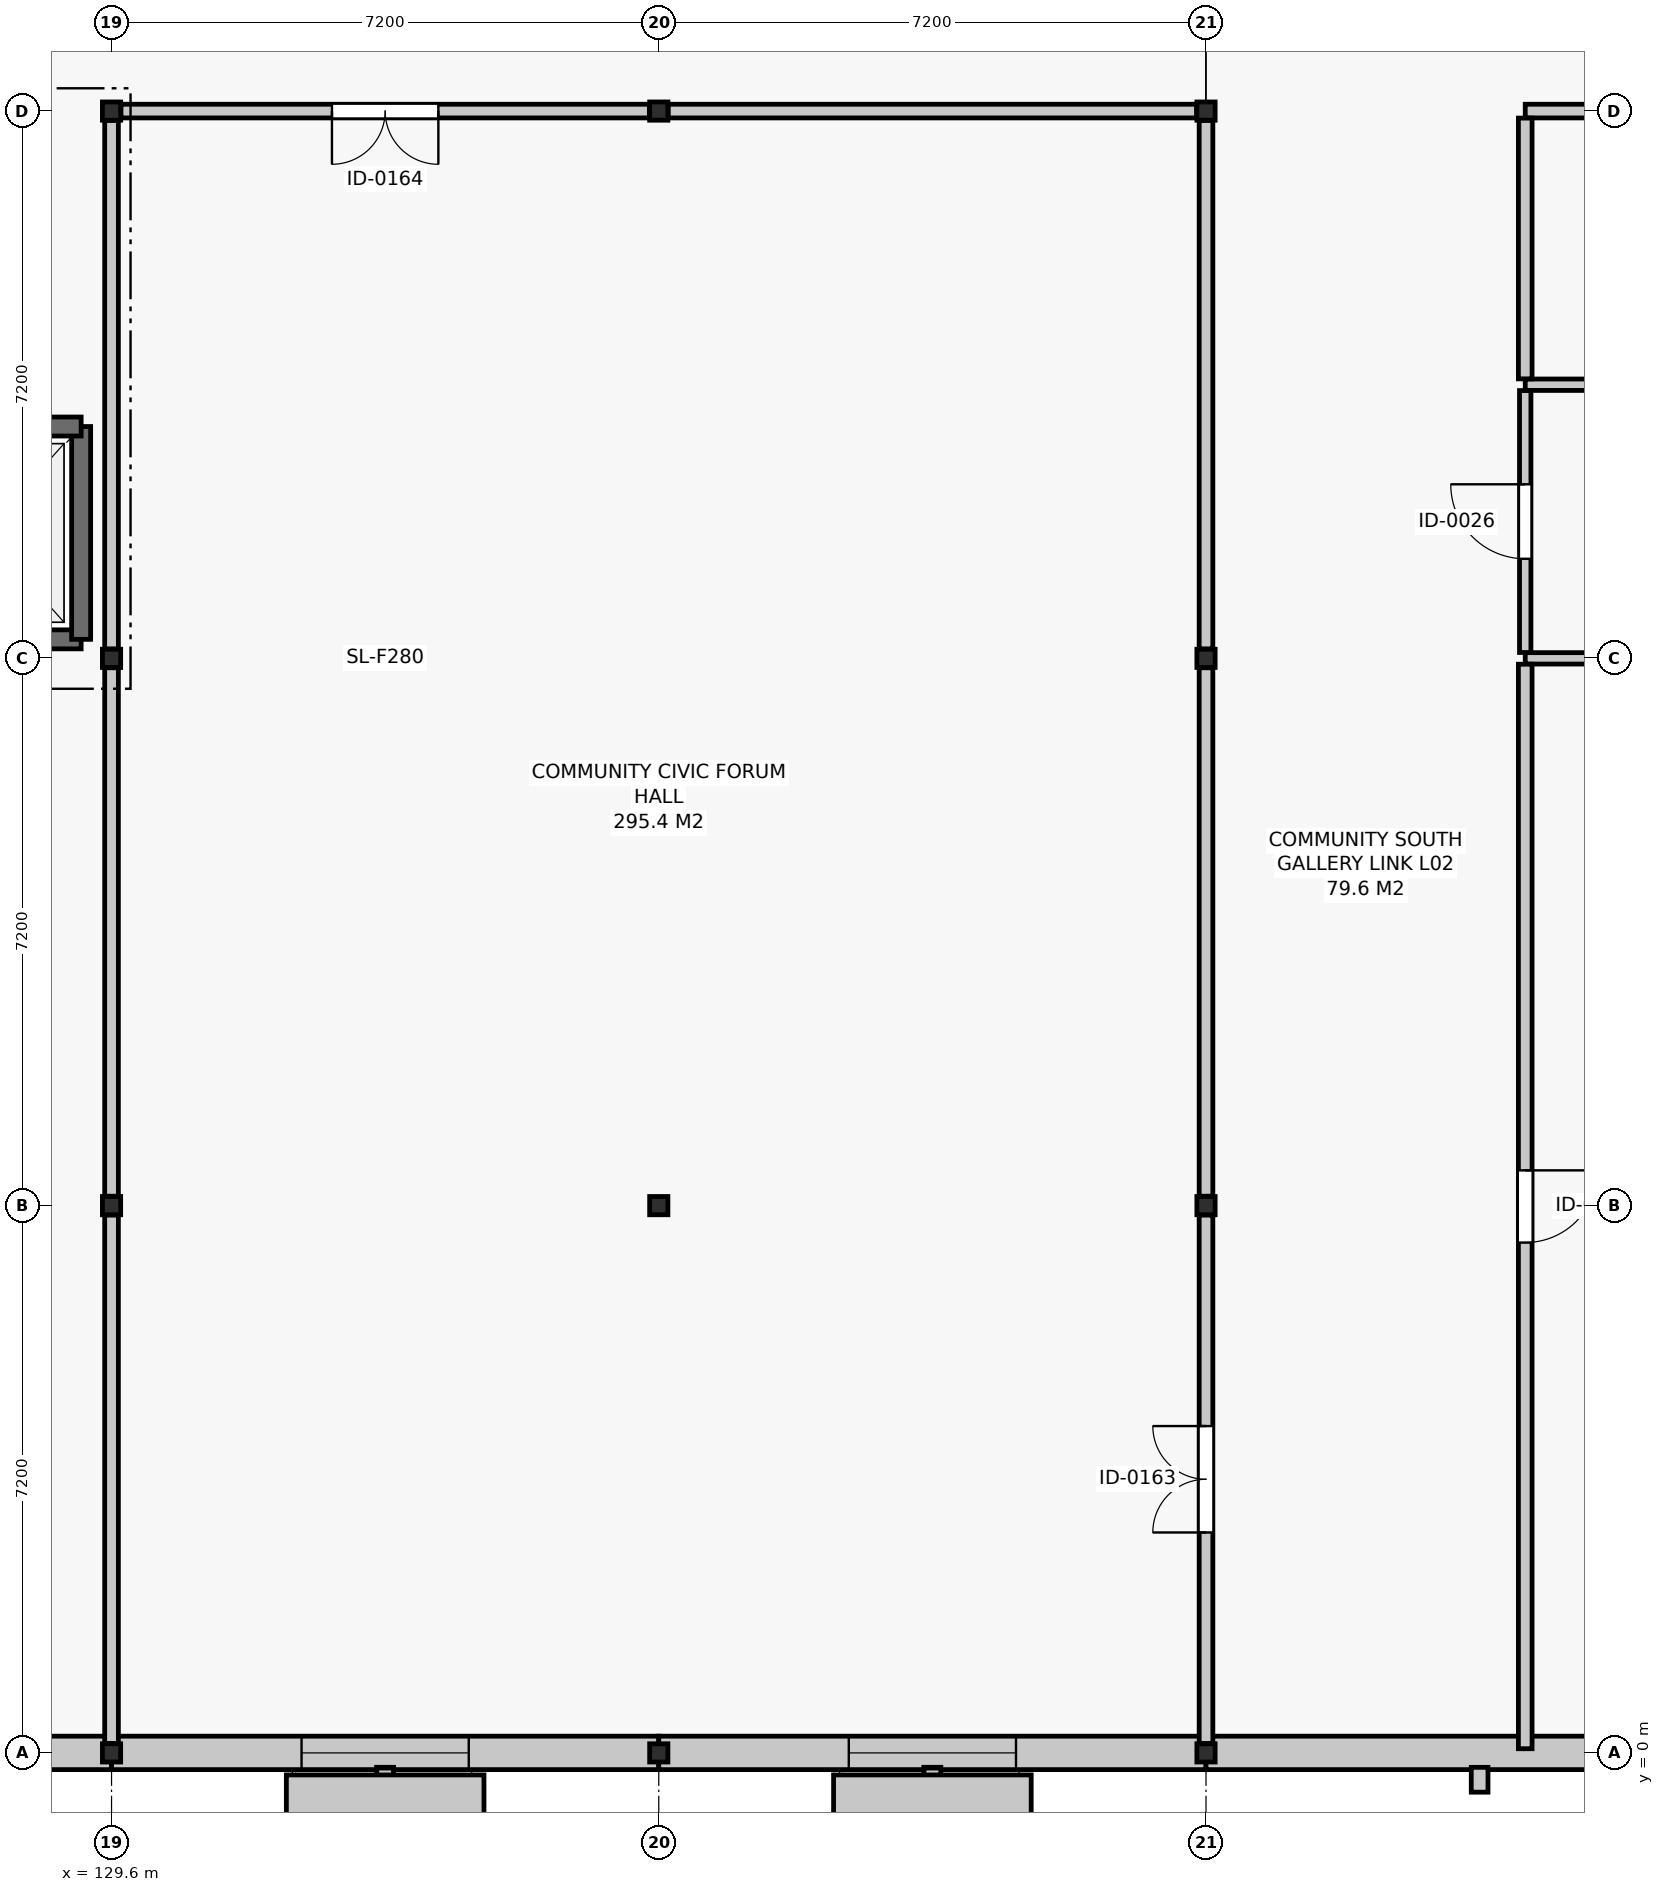
"""IFC4 building model, lengths in metres.
Left out: names, types, materials, properties, quantities, classifications, styles, units other than length and angle.
Written with IfcOpenShell. Run it as: python <this file> out.ifc"""

import sys

from ifc_helpers import new_model, si_unit, direction, frame, frame_2d, origin, origin_2d, place, context, subcontext, project, spatial, rectangle, i_section, extrude, element, fill, save


model = new_model("IFC4")
c1 = context("Model", 3, precision=1e-05, world=origin(), true_north=direction((0.0, 1.0)))
c2 = subcontext(c1, "Body", "Model", "MODEL_VIEW")
j1 = project(units=[si_unit("LENGTHUNIT", "METRE"), si_unit("PLANEANGLEUNIT", "RADIAN")], contexts=[c1])
p1 = place(None, origin())
s1 = spatial("IfcSite", under=j1, at=p1, CompositionType="ELEMENT")
p2 = place(p1, origin())
s2 = spatial("IfcBuilding", under=s1, at=p2, CompositionType="ELEMENT")
p3 = place(p2, frame((0.0, 0.0, 10.2)))
s3 = spatial("IfcBuildingStorey", under=s2, at=p3, CompositionType="ELEMENT", Elevation=10.2)
for number, where, z_axis, x_axis in (
    (1, (129.6, 0.0, 0.0), (0.0, 0.0, 1.0), (1.0, 0.0, 0.0)),
    (2, (129.6, 7.2, 0.0), (0.0, 0.0, 1.0), (1.0, 0.0, 0.0)),
    (3, (129.6, 14.4, 0.0), (0.0, 0.0, 1.0), (1.0, 0.0, 0.0)),
    (4, (129.6, 21.6, 0.0), (0.0, 0.0, 1.0), (1.0, 0.0, 0.0)),
    (5, (136.8, 0.0, 0.0), (0.0, 0.0, 1.0), (1.0, 0.0, 0.0)),
    (6, (136.8, 7.2, 0.0), (0.0, 0.0, 1.0), (1.0, 0.0, 0.0)),
    (7, (136.8, 21.6, 0.0), (0.0, 0.0, 1.0), (1.0, 0.0, 0.0)),
    (8, (144.0, 0.0, 0.0), (0.0, 0.0, 1.0), (1.0, 0.0, 0.0)),
    (9, (144.0, 7.2, 0.0), (0.0, 0.0, 1.0), (1.0, 0.0, 0.0)),
    (10, (144.0, 14.4, 0.0), (0.0, 0.0, 1.0), (1.0, 0.0, 0.0)),
    (11, (144.0, 21.6, 0.0), (0.0, 0.0, 1.0), (1.0, 0.0, 0.0)),
):
    element("IfcColumn", number, at=place(p3, frame(where, z_axis=z_axis, x_axis=x_axis)), inside=s3, PredefinedType="COLUMN", context=c2, shape_type="SweptSolid", body=[
        extrude(i_section(OverallWidth=0.24, OverallDepth=0.24, WebThickness=0.01, FlangeThickness=0.017, FilletRadius=0.021, at=origin_2d()), origin(), (0.0, 0.0, 1.0), 4.2),
    ])
p4 = place(p3, frame((122.524, 0.0, 0.0), z_axis=(0.0, 0.0, 1.0), x_axis=(1.0, 0.0, 0.0)))
e12 = element("IfcWall", 12, at=p4, inside=s3, PredefinedType="SOLIDWALL", context=c2, shape_type="SweptSolid", body=[
    extrude(rectangle(XDim=7.076, YDim=0.44, at=frame_2d((3.538, 0.0))), origin(), (0.0, 0.0, 1.0), 3.2),
])
p5 = place(p4, frame((2.376, 0.0, 0.87)))
e13 = element("IfcOpeningElement", 13, at=p5, cuts=e12, PredefinedType="OPENING", context=c2, shape_type="SweptSolid", body=[
    extrude(rectangle(XDim=2.2, YDim=2.25, at=frame_2d((1.1, 1.125))), frame((0.0, 0.232, 0.0), z_axis=(0.0, -1.0, 0.0), x_axis=(1.0, 0.0, 0.0)), (0.0, 0.0, 1.0), 0.464),
])
p6 = place(p3, frame((129.6, 0.0, 0.0), z_axis=(0.0, 0.0, 1.0), x_axis=(1.0, 0.0, 0.0)))
e14 = element("IfcWall", 14, at=p6, inside=s3, PredefinedType="SOLIDWALL", context=c2, shape_type="SweptSolid", body=[
    extrude(rectangle(XDim=7.2, YDim=0.44, at=frame_2d((3.6, 0.0))), origin(), (0.0, 0.0, 1.0), 3.2),
])
p7 = place(p6, frame((2.5, 0.0, 0.87)))
e15 = element("IfcOpeningElement", 15, at=p7, cuts=e14, PredefinedType="OPENING", context=c2, shape_type="SweptSolid", body=[
    extrude(rectangle(XDim=2.2, YDim=2.25, at=frame_2d((1.1, 1.125))), frame((0.0, 0.232, 0.0), z_axis=(0.0, -1.0, 0.0), x_axis=(1.0, 0.0, 0.0)), (0.0, 0.0, 1.0), 0.464),
])
p8 = place(p3, frame((136.8, 0.0, 0.0), z_axis=(0.0, 0.0, 1.0), x_axis=(1.0, 0.0, 0.0)))
e16 = element("IfcWall", 16, at=p8, inside=s3, PredefinedType="SOLIDWALL", context=c2, shape_type="SweptSolid", body=[
    extrude(rectangle(XDim=7.2, YDim=0.44, at=frame_2d((3.6, 0.0))), origin(), (0.0, 0.0, 1.0), 3.2),
])
p9 = place(p8, frame((2.5, 0.0, 0.87)))
e17 = element("IfcOpeningElement", 17, at=p9, cuts=e16, PredefinedType="OPENING", context=c2, shape_type="SweptSolid", body=[
    extrude(rectangle(XDim=2.2, YDim=2.25, at=frame_2d((1.1, 1.125))), frame((0.0, 0.232, 0.0), z_axis=(0.0, -1.0, 0.0), x_axis=(1.0, 0.0, 0.0)), (0.0, 0.0, 1.0), 0.464),
])
p10 = place(p3, frame((144.0, 0.0, 0.0), z_axis=(0.0, 0.0, 1.0), x_axis=(1.0, 0.0, 0.0)))
e18 = element("IfcWall", 18, at=p10, inside=s3, PredefinedType="SOLIDWALL", context=c2, shape_type="SweptSolid", body=[
    extrude(rectangle(XDim=7.2, YDim=0.44, at=frame_2d((3.6, 0.0))), origin(), (0.0, 0.0, 1.0), 3.2),
])
p11 = place(p3, frame((126.65, 14.65, 0.0), z_axis=(0.0, 0.0, 1.0), x_axis=(1.0, 0.0, 0.0)))
e19 = element("IfcWall", 19, at=p11, inside=s3, PredefinedType="SHEAR", context=c2, shape_type="SweptSolid", body=[
    extrude(rectangle(XDim=2.55, YDim=0.25, at=frame_2d((1.275, 0.0))), origin(), (0.0, 0.0, 1.0), 3.92),
])
p12 = place(p3, frame((129.2, 14.65, 0.0), z_axis=(0.0, 0.0, 1.0), x_axis=(0.0, 1.0, 0.0)))
e20 = element("IfcWall", 20, at=p12, inside=s3, PredefinedType="SHEAR", context=c2, shape_type="SweptSolid", body=[
    extrude(rectangle(XDim=2.8, YDim=0.25, at=frame_2d((1.4, 0.0))), origin(), (0.0, 0.0, 1.0), 3.92),
])
p13 = place(p3, frame((129.2, 17.45, 0.0), z_axis=(0.0, 0.0, 1.0), x_axis=(-1.0, 0.0, 0.0)))
e21 = element("IfcWall", 21, at=p13, inside=s3, PredefinedType="SHEAR", context=c2, shape_type="SweptSolid", body=[
    extrude(rectangle(XDim=2.55, YDim=0.25, at=frame_2d((1.275, 0.0))), origin(), (0.0, 0.0, 1.0), 3.92),
])
p14 = place(p13, frame((0.725, 0.0, 0.0)))
e22 = element("IfcOpeningElement", 22, at=p14, cuts=e21, PredefinedType="OPENING", context=c2, shape_type="SweptSolid", body=[
    extrude(rectangle(XDim=1.1, YDim=2.1, at=frame_2d((0.55, 1.05))), frame((0.0, 0.137, 0.0), z_axis=(0.0, -1.0, 0.0), x_axis=(1.0, 0.0, 0.0)), (0.0, 0.0, 1.0), 0.274),
])
p15 = place(p3, frame((148.2, 14.4, 0.0), z_axis=(0.0, 0.0, 1.0), x_axis=(1.0, 0.0, 0.0)))
e23 = element("IfcWall", 23, at=p15, inside=s3, PredefinedType="PARTITIONING", context=c2, shape_type="SweptSolid", body=[
    extrude(rectangle(XDim=2.876, YDim=0.15, at=frame_2d((1.438, 0.0))), origin(), (0.0, 0.0, 1.0), 3.515),
])
p16 = place(p3, frame((148.2, 18.0, 0.0), z_axis=(0.0, 0.0, 1.0), x_axis=(1.0, 0.0, 0.0)))
e24 = element("IfcWall", 24, at=p16, inside=s3, PredefinedType="PARTITIONING", context=c2, shape_type="SweptSolid", body=[
    extrude(rectangle(XDim=6.6, YDim=0.15, at=frame_2d((3.3, 0.0))), origin(), (0.0, 0.0, 1.0), 3.555),
])
p17 = place(p3, frame((148.2, 21.6, 0.0), z_axis=(0.0, 0.0, 1.0), x_axis=(1.0, 0.0, 0.0)))
e25 = element("IfcWall", 25, at=p17, inside=s3, PredefinedType="PARTITIONING", context=c2, shape_type="SweptSolid", body=[
    extrude(rectangle(XDim=2.876, YDim=0.18, at=frame_2d((1.438, 0.0))), origin(), (0.0, 0.0, 1.0), 3.515),
])
p18 = place(p3, frame((129.724, 21.6, 0.0), z_axis=(0.0, 0.0, 1.0), x_axis=(1.0, 0.0, 0.0)))
e26 = element("IfcWall", 26, at=p18, inside=s3, PredefinedType="PARTITIONING", context=c2, shape_type="SweptSolid", body=[
    extrude(rectangle(XDim=6.952, YDim=0.18, at=frame_2d((3.476, 0.0))), origin(), (0.0, 0.0, 1.0), 3.205),
])
p19 = place(p18, frame((2.776, 0.0, 0.0)))
e27 = element("IfcOpeningElement", 27, at=p19, cuts=e26, PredefinedType="OPENING", context=c2, shape_type="SweptSolid", body=[
    extrude(rectangle(XDim=1.4, YDim=2.2, at=frame_2d((0.7, 1.1))), frame((0.0, 0.102, 0.0), z_axis=(0.0, -1.0, 0.0), x_axis=(1.0, 0.0, 0.0)), (0.0, 0.0, 1.0), 0.204),
])
p20 = place(p3, frame((136.924, 21.6, 0.0), z_axis=(0.0, 0.0, 1.0), x_axis=(1.0, 0.0, 0.0)))
e28 = element("IfcWall", 28, at=p20, inside=s3, PredefinedType="PARTITIONING", context=c2, shape_type="SweptSolid", body=[
    extrude(rectangle(XDim=6.952, YDim=0.18, at=frame_2d((3.476, 0.0))), origin(), (0.0, 0.0, 1.0), 3.205),
])
p21 = place(p3, frame((148.2, 14.477, 0.0), z_axis=(0.0, 0.0, 1.0), x_axis=(0.0, 1.0, 0.0)))
e29 = element("IfcWall", 29, at=p21, inside=s3, PredefinedType="PARTITIONING", context=c2, shape_type="SweptSolid", body=[
    extrude(rectangle(XDim=3.446, YDim=0.15, at=frame_2d((1.723, 0.0))), origin(), (0.0, 0.0, 1.0), 3.515),
])
p22 = place(p21, frame((1.233, 0.0, 0.0)))
e30 = element("IfcOpeningElement", 30, at=p22, cuts=e29, PredefinedType="OPENING", context=c2, shape_type="SweptSolid", body=[
    extrude(rectangle(XDim=0.98, YDim=2.1, at=frame_2d((0.49, 1.05))), frame((0.0, 0.087, 0.0), z_axis=(0.0, -1.0, 0.0), x_axis=(1.0, 0.0, 0.0)), (0.0, 0.0, 1.0), 0.174),
])
p23 = place(p3, frame((148.2, 0.055, 0.0), z_axis=(0.0, 0.0, 1.0), x_axis=(0.0, 1.0, 0.0)))
e31 = element("IfcWall", 31, at=p23, inside=s3, PredefinedType="PARTITIONING", context=c2, shape_type="SweptSolid", body=[
    extrude(rectangle(XDim=14.268, YDim=0.18, at=frame_2d((7.134, 0.0))), origin(), (0.0, 0.0, 1.0), 3.355),
])
p24 = place(p23, frame((6.659, 0.0, 0.0)))
e32 = element("IfcOpeningElement", 32, at=p24, cuts=e31, PredefinedType="OPENING", context=c2, shape_type="SweptSolid", body=[
    extrude(rectangle(XDim=0.95, YDim=2.15, at=frame_2d((0.475, 1.075))), frame((0.0, 0.102, 0.0), z_axis=(0.0, -1.0, 0.0), x_axis=(1.0, 0.0, 0.0)), (0.0, 0.0, 1.0), 0.204),
])
p25 = place(p3, frame((148.2, 18.077, 0.0), z_axis=(0.0, 0.0, 1.0), x_axis=(0.0, 1.0, 0.0)))
e33 = element("IfcWall", 33, at=p25, inside=s3, PredefinedType="PARTITIONING", context=c2, shape_type="SweptSolid", body=[
    extrude(rectangle(XDim=3.431, YDim=0.18, at=frame_2d((1.716, 0.0))), origin(), (0.0, 0.0, 1.0), 3.515),
])
p26 = place(p3, frame((129.6, 0.124, 0.0), z_axis=(0.0, 0.0, 1.0), x_axis=(0.0, 1.0, 0.0)))
e34 = element("IfcWall", 34, at=p26, inside=s3, PredefinedType="PARTITIONING", context=c2, shape_type="SweptSolid", body=[
    extrude(rectangle(XDim=6.952, YDim=0.18, at=frame_2d((3.476, 0.0))), origin(), (0.0, 0.0, 1.0), 3.515),
])
p27 = place(p3, frame((129.6, 7.324, 0.0), z_axis=(0.0, 0.0, 1.0), x_axis=(0.0, 1.0, 0.0)))
e35 = element("IfcWall", 35, at=p27, inside=s3, PredefinedType="PARTITIONING", context=c2, shape_type="SweptSolid", body=[
    extrude(rectangle(XDim=6.952, YDim=0.18, at=frame_2d((3.476, 0.0))), origin(), (0.0, 0.0, 1.0), 3.015),
])
p28 = place(p3, frame((129.6, 14.524, 0.0), z_axis=(0.0, 0.0, 1.0), x_axis=(0.0, 1.0, 0.0)))
e36 = element("IfcWall", 36, at=p28, inside=s3, PredefinedType="PARTITIONING", context=c2, shape_type="SweptSolid", body=[
    extrude(rectangle(XDim=6.952, YDim=0.18, at=frame_2d((3.476, 0.0))), origin(), (0.0, 0.0, 1.0), 3.015),
])
p29 = place(p3, frame((144.0, 0.124, 0.0), z_axis=(0.0, 0.0, 1.0), x_axis=(0.0, 1.0, 0.0)))
e37 = element("IfcWall", 37, at=p29, inside=s3, PredefinedType="PARTITIONING", context=c2, shape_type="SweptSolid", body=[
    extrude(rectangle(XDim=6.952, YDim=0.18, at=frame_2d((3.476, 0.0))), origin(), (0.0, 0.0, 1.0), 3.515),
])
p30 = place(p29, frame((2.776, 0.0, 0.0)))
e38 = element("IfcOpeningElement", 38, at=p30, cuts=e37, PredefinedType="OPENING", context=c2, shape_type="SweptSolid", body=[
    extrude(rectangle(XDim=1.4, YDim=2.2, at=frame_2d((0.7, 1.1))), frame((0.0, 0.102, 0.0), z_axis=(0.0, -1.0, 0.0), x_axis=(1.0, 0.0, 0.0)), (0.0, 0.0, 1.0), 0.204),
])
p31 = place(p3, frame((144.0, 7.324, 0.0), z_axis=(0.0, 0.0, 1.0), x_axis=(0.0, 1.0, 0.0)))
e39 = element("IfcWall", 39, at=p31, inside=s3, PredefinedType="PARTITIONING", context=c2, shape_type="SweptSolid", body=[
    extrude(rectangle(XDim=6.952, YDim=0.18, at=frame_2d((3.476, 0.0))), origin(), (0.0, 0.0, 1.0), 3.015),
])
p32 = place(p3, frame((144.0, 14.524, 0.0), z_axis=(0.0, 0.0, 1.0), x_axis=(0.0, 1.0, 0.0)))
e40 = element("IfcWall", 40, at=p32, inside=s3, PredefinedType="PARTITIONING", context=c2, shape_type="SweptSolid", body=[
    extrude(rectangle(XDim=6.952, YDim=0.18, at=frame_2d((3.476, 0.0))), origin(), (0.0, 0.0, 1.0), 3.015),
])
p33 = place(p7, origin())
e41 = element("IfcWindow", 41, at=p33, inside=s3, PartitioningType="SINGLE_PANEL", PredefinedType="WINDOW", context=c2, shape_type="SweptSolid", body=[
    extrude(rectangle(XDim=2.2, YDim=2.25, at=frame_2d((1.1, 1.125))), frame((0.0, 0.03, 0.0), z_axis=(0.0, -1.0, 0.0), x_axis=(1.0, 0.0, 0.0)), (0.0, 0.0, 1.0), 0.06),
])
fill(e15, e41)
p34 = place(p9, origin())
e42 = element("IfcWindow", 42, at=p34, inside=s3, PartitioningType="SINGLE_PANEL", PredefinedType="WINDOW", context=c2, shape_type="SweptSolid", body=[
    extrude(rectangle(XDim=2.2, YDim=2.25, at=frame_2d((1.1, 1.125))), frame((0.0, 0.03, 0.0), z_axis=(0.0, -1.0, 0.0), x_axis=(1.0, 0.0, 0.0)), (0.0, 0.0, 1.0), 0.06),
])
fill(e17, e42)
p35 = place(p22, origin())
e43 = element("IfcDoor", 43, at=p35, inside=s3, OperationType="SINGLE_SWING_RIGHT", PredefinedType="DOOR", context=c2, shape_type="SweptSolid", body=[
    extrude(rectangle(XDim=0.98, YDim=2.1, at=frame_2d((0.49, 1.05))), frame((0.0, 0.025, 0.0), z_axis=(0.0, -1.0, 0.0), x_axis=(1.0, 0.0, 0.0)), (0.0, 0.0, 1.0), 0.05),
])
fill(e30, e43)
p36 = place(p24, frame((0.95, 0.0, 0.0), z_axis=(0.0, 0.0, 1.0), x_axis=(-1.0, 0.0, 0.0)))
e44 = element("IfcDoor", 44, at=p36, inside=s3, OperationType="SINGLE_SWING_LEFT", PredefinedType="DOOR", context=c2, shape_type="SweptSolid", body=[
    extrude(rectangle(XDim=0.95, YDim=2.15, at=frame_2d((0.475, 1.075))), frame((0.0, 0.025, 0.0), z_axis=(0.0, -1.0, 0.0), x_axis=(1.0, 0.0, 0.0)), (0.0, 0.0, 1.0), 0.05),
])
fill(e32, e44)
p37 = place(p30, origin())
e45 = element("IfcDoor", 45, at=p37, inside=s3, OperationType="DOUBLE_DOOR_SINGLE_SWING", PredefinedType="DOOR", context=c2, shape_type="SweptSolid", body=[
    extrude(rectangle(XDim=1.4, YDim=2.2, at=frame_2d((0.7, 1.1))), frame((0.0, 0.025, 0.0), z_axis=(0.0, -1.0, 0.0), x_axis=(1.0, 0.0, 0.0)), (0.0, 0.0, 1.0), 0.05),
])
fill(e38, e45)
p38 = place(p19, frame((1.4, 0.0, 0.0), z_axis=(0.0, 0.0, 1.0), x_axis=(-1.0, 0.0, 0.0)))
e46 = element("IfcDoor", 46, at=p38, inside=s3, OperationType="DOUBLE_DOOR_SINGLE_SWING", PredefinedType="DOOR", context=c2, shape_type="SweptSolid", body=[
    extrude(rectangle(XDim=1.4, YDim=2.2, at=frame_2d((0.7, 1.1))), frame((0.0, 0.025, 0.0), z_axis=(0.0, -1.0, 0.0), x_axis=(1.0, 0.0, 0.0)), (0.0, 0.0, 1.0), 0.05),
])
fill(e27, e46)
save(model, sys.argv[1])
